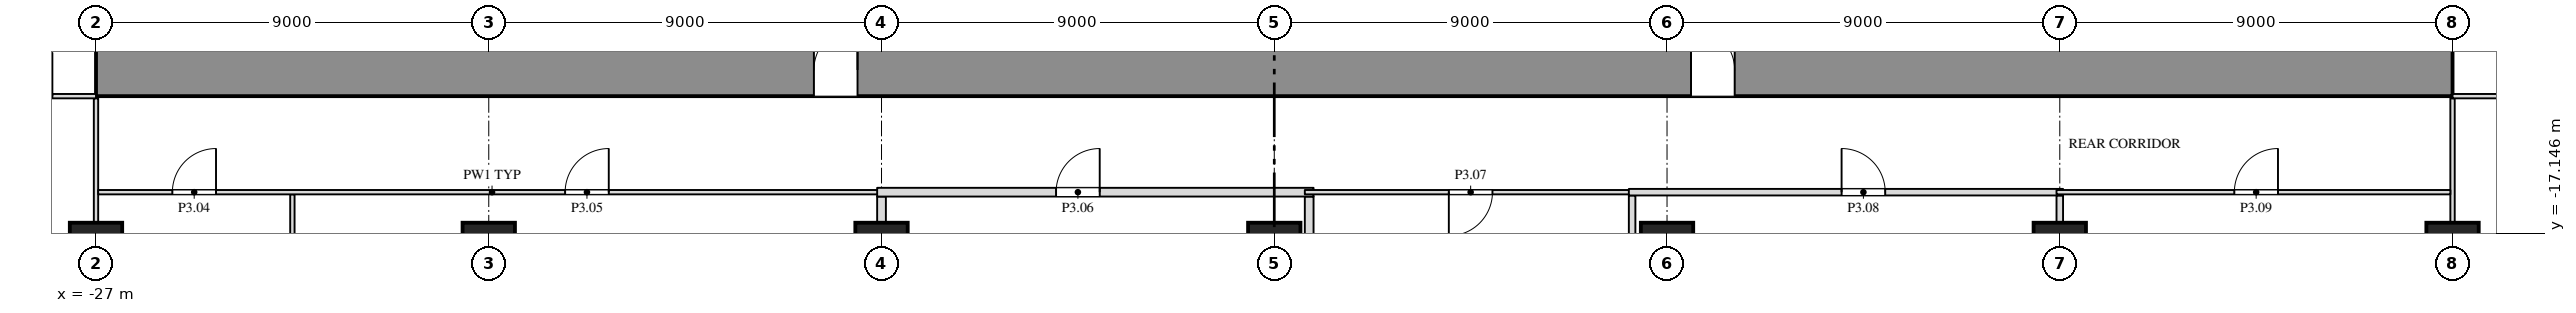
"""IFC4 building model, lengths in metres.
Left out: names, types, materials, properties, quantities, classifications, styles, units other than length and angle.
Written with IfcOpenShell. Run it as: python <this file> out.ifc"""

import sys

from ifc_helpers import new_model, si_unit, direction, frame, frame_2d, origin, origin_2d, place, context, subcontext, project, spatial, rectangle, extrude, element, fill, save


model = new_model("IFC4")
c1 = context("Model", 3, precision=1e-05, world=origin(), true_north=direction((0.0, 1.0)))
c2 = subcontext(c1, "Body", "Model", "MODEL_VIEW")
j1 = project(units=[si_unit("LENGTHUNIT", "METRE"), si_unit("PLANEANGLEUNIT", "RADIAN")], contexts=[c1])
p1 = place(None, origin())
s1 = spatial("IfcSite", under=j1, at=p1, CompositionType="ELEMENT")
p2 = place(p1, origin())
s2 = spatial("IfcBuilding", under=s1, at=p2, CompositionType="ELEMENT")
p3 = place(p2, frame((0.0, 0.0, 21.0)))
s3 = spatial("IfcBuildingStorey", under=s2, at=p3, CompositionType="ELEMENT", Elevation=21.0)
for number, where, z_axis, x_axis in (
    (1, (-27.0, -17.5, 0.0), (0.0, 0.0, 1.0), (1.0, 0.0, 0.0)),
    (2, (-18.0, -17.5, 0.0), (0.0, 0.0, 1.0), (1.0, 0.0, 0.0)),
    (3, (-9.0, -17.5, 0.0), (0.0, 0.0, 1.0), (1.0, 0.0, 0.0)),
    (4, (0.0, -17.5, 0.0), (0.0, 0.0, 1.0), (1.0, 0.0, 0.0)),
    (5, (9.0, -17.5, 0.0), (0.0, 0.0, 1.0), (1.0, 0.0, 0.0)),
    (6, (18.0, -17.5, 0.0), (0.0, 0.0, 1.0), (1.0, 0.0, 0.0)),
    (7, (27.0, -17.5, 0.0), (0.0, 0.0, 1.0), (1.0, 0.0, 0.0)),
):
    element("IfcColumn", number, at=place(p3, frame(where, z_axis=z_axis, x_axis=x_axis)), inside=s3, PredefinedType="COLUMN", context=c2, shape_type="SweptSolid", body=[
        extrude(rectangle(XDim=1.2, YDim=1.2, at=origin_2d()), origin(), (0.0, 0.0, 1.0), 6.0),
    ])
p4 = place(p3, frame((-27.0, -13.4, 0.0), z_axis=(0.0, 0.0, 1.0), x_axis=(1.0, 0.0, 0.0)))
e8 = element("IfcWall", 8, at=p4, inside=s3, PredefinedType="SHEAR", context=c2, shape_type="SweptSolid", body=[
    extrude(rectangle(XDim=54.0, YDim=1.2, at=frame_2d((27.0, 0.0))), origin(), (0.0, 0.0, 1.0), 5.7),
])
p5 = place(p4, frame((16.45, 0.0, 0.0)))
e9 = element("IfcOpeningElement", 9, at=p5, cuts=e8, PredefinedType="OPENING", context=c2, shape_type="SweptSolid", body=[
    extrude(rectangle(XDim=1.0, YDim=2.1, at=frame_2d((0.5, 1.05))), frame((0.0, 0.612, 0.0), z_axis=(0.0, -1.0, 0.0), x_axis=(1.0, 0.0, 0.0)), (0.0, 0.0, 1.0), 1.224),
])
p6 = place(p4, frame((36.55, 0.0, 0.0)))
e10 = element("IfcOpeningElement", 10, at=p6, cuts=e8, PredefinedType="OPENING", context=c2, shape_type="SweptSolid", body=[
    extrude(rectangle(XDim=1.0, YDim=2.1, at=frame_2d((0.5, 1.05))), frame((0.0, 0.612, 0.0), z_axis=(0.0, -1.0, 0.0), x_axis=(1.0, 0.0, 0.0)), (0.0, 0.0, 1.0), 1.224),
])
p7 = place(p3, frame((-27.0, -16.9, 0.0), z_axis=(0.0, 0.0, 1.0), x_axis=(0.0, 1.0, 0.0)))
e11 = element("IfcWall", 11, at=p7, inside=s3, PredefinedType="PARTITIONING", context=c2, shape_type="SweptSolid", body=[
    extrude(rectangle(XDim=2.85, YDim=0.1, at=frame_2d((1.425, 0.0))), origin(), (0.0, 0.0, 1.0), 5.088),
])
p8 = place(p3, frame((-22.5, -26.663, 0.0), z_axis=(0.0, 0.0, 1.0), x_axis=(0.0, 1.0, 0.0)))
e12 = element("IfcWall", 12, at=p8, inside=s3, PredefinedType="PARTITIONING", context=c2, shape_type="SweptSolid", body=[
    extrude(rectangle(XDim=10.413, YDim=0.1, at=frame_2d((5.206, 0.0))), origin(), (0.0, 0.0, 1.0), 5.088),
])
p9 = place(p3, frame((-9.0, -16.9, 0.0), z_axis=(0.0, 0.0, 1.0), x_axis=(0.0, 1.0, 0.0)))
e13 = element("IfcWall", 13, at=p9, inside=s3, PredefinedType="PARTITIONING", context=c2, shape_type="SweptSolid", body=[
    extrude(rectangle(XDim=0.6, YDim=0.2, at=frame_2d((0.3, 0.0))), origin(), (0.0, 0.0, 1.0), 5.7),
])
p10 = place(p3, frame((0.8, -27.2, 0.0), z_axis=(0.0, 0.0, 1.0), x_axis=(0.0, 1.0, 0.0)))
e14 = element("IfcWall", 14, at=p10, inside=s3, PredefinedType="PARTITIONING", context=c2, shape_type="SweptSolid", body=[
    extrude(rectangle(XDim=10.9, YDim=0.2, at=frame_2d((5.45, 0.0))), origin(), (0.0, 0.0, 1.0), 5.7),
])
p11 = place(p3, frame((8.2, -27.2, 0.0), z_axis=(0.0, 0.0, 1.0), x_axis=(0.0, 1.0, 0.0)))
e15 = element("IfcWall", 15, at=p11, inside=s3, PredefinedType="PARTITIONING", context=c2, shape_type="SweptSolid", body=[
    extrude(rectangle(XDim=10.925, YDim=0.15, at=frame_2d((5.462, 0.0))), origin(), (0.0, 0.0, 1.0), 5.7),
])
p12 = place(p3, frame((18.0, -16.9, 0.0), z_axis=(0.0, 0.0, 1.0), x_axis=(0.0, 1.0, 0.0)))
e16 = element("IfcWall", 16, at=p12, inside=s3, PredefinedType="PARTITIONING", context=c2, shape_type="SweptSolid", body=[
    extrude(rectangle(XDim=0.625, YDim=0.15, at=frame_2d((0.312, 0.0))), origin(), (0.0, 0.0, 1.0), 5.7),
])
p13 = place(p3, frame((27.0, -16.9, 0.0), z_axis=(0.0, 0.0, 1.0), x_axis=(0.0, 1.0, 0.0)))
e17 = element("IfcWall", 17, at=p13, inside=s3, PredefinedType="PARTITIONING", context=c2, shape_type="SweptSolid", body=[
    extrude(rectangle(XDim=2.85, YDim=0.1, at=frame_2d((1.425, 0.0))), origin(), (0.0, 0.0, 1.0), 5.088),
])
p14 = place(p3, frame((-26.95, -16.2, 0.0), z_axis=(0.0, 0.0, 1.0), x_axis=(1.0, 0.0, 0.0)))
e18 = element("IfcWall", 18, at=p14, inside=s3, PredefinedType="PARTITIONING", context=c2, shape_type="SweptSolid", body=[
    extrude(rectangle(XDim=18.05, YDim=0.1, at=frame_2d((9.025, 0.0))), origin(), (0.0, 0.0, 1.0), 5.7),
])
p15 = place(p14, frame((1.7, 0.0, 0.0)))
e19 = element("IfcOpeningElement", 19, at=p15, cuts=e18, PredefinedType="OPENING", context=c2, shape_type="SweptSolid", body=[
    extrude(rectangle(XDim=1.0, YDim=2.1, at=frame_2d((0.5, 1.05))), frame((0.0, 0.062, 0.0), z_axis=(0.0, -1.0, 0.0), x_axis=(1.0, 0.0, 0.0)), (0.0, 0.0, 1.0), 0.124),
])
p16 = place(p14, frame((10.7, 0.0, 0.0)))
e20 = element("IfcOpeningElement", 20, at=p16, cuts=e18, PredefinedType="OPENING", context=c2, shape_type="SweptSolid", body=[
    extrude(rectangle(XDim=1.0, YDim=2.1, at=frame_2d((0.5, 1.05))), frame((0.0, 0.062, 0.0), z_axis=(0.0, -1.0, 0.0), x_axis=(1.0, 0.0, 0.0)), (0.0, 0.0, 1.0), 0.124),
])
p17 = place(p3, frame((-9.1, -16.2, 0.0), z_axis=(0.0, 0.0, 1.0), x_axis=(1.0, 0.0, 0.0)))
e21 = element("IfcWall", 21, at=p17, inside=s3, PredefinedType="PARTITIONING", context=c2, shape_type="SweptSolid", body=[
    extrude(rectangle(XDim=10.0, YDim=0.2, at=frame_2d((5.0, 0.0))), origin(), (0.0, 0.0, 1.0), 5.7),
])
p18 = place(p17, frame((4.1, 0.0, 0.0)))
e22 = element("IfcOpeningElement", 22, at=p18, cuts=e21, PredefinedType="OPENING", context=c2, shape_type="SweptSolid", body=[
    extrude(rectangle(XDim=1.0, YDim=2.1, at=frame_2d((0.5, 1.05))), frame((0.0, 0.112, 0.0), z_axis=(0.0, -1.0, 0.0), x_axis=(1.0, 0.0, 0.0)), (0.0, 0.0, 1.0), 0.224),
])
p19 = place(p3, frame((0.7, -16.2, 0.0), z_axis=(0.0, 0.0, 1.0), x_axis=(1.0, 0.0, 0.0)))
e23 = element("IfcWall", 23, at=p19, inside=s3, PredefinedType="PARTITIONING", context=c2, shape_type="SweptSolid", body=[
    extrude(rectangle(XDim=7.575, YDim=0.1, at=frame_2d((3.788, 0.0))), origin(), (0.0, 0.0, 1.0), 5.7),
])
p20 = place(p19, frame((3.3, 0.0, 0.0)))
e24 = element("IfcOpeningElement", 24, at=p20, cuts=e23, PredefinedType="OPENING", context=c2, shape_type="SweptSolid", body=[
    extrude(rectangle(XDim=1.0, YDim=2.1, at=frame_2d((0.5, 1.05))), frame((0.0, 0.062, 0.0), z_axis=(0.0, -1.0, 0.0), x_axis=(1.0, 0.0, 0.0)), (0.0, 0.0, 1.0), 0.124),
])
p21 = place(p3, frame((8.125, -16.2, 0.0), z_axis=(0.0, 0.0, 1.0), x_axis=(1.0, 0.0, 0.0)))
e25 = element("IfcWall", 25, at=p21, inside=s3, PredefinedType="PARTITIONING", context=c2, shape_type="SweptSolid", body=[
    extrude(rectangle(XDim=9.95, YDim=0.15, at=frame_2d((4.975, 0.0))), origin(), (0.0, 0.0, 1.0), 5.7),
])
p22 = place(p21, frame((4.875, 0.0, 0.0)))
e26 = element("IfcOpeningElement", 26, at=p22, cuts=e25, PredefinedType="OPENING", context=c2, shape_type="SweptSolid", body=[
    extrude(rectangle(XDim=1.0, YDim=2.1, at=frame_2d((0.5, 1.05))), frame((0.0, 0.087, 0.0), z_axis=(0.0, -1.0, 0.0), x_axis=(1.0, 0.0, 0.0)), (0.0, 0.0, 1.0), 0.174),
])
p23 = place(p3, frame((17.925, -16.2, 0.0), z_axis=(0.0, 0.0, 1.0), x_axis=(1.0, 0.0, 0.0)))
e27 = element("IfcWall", 27, at=p23, inside=s3, PredefinedType="PARTITIONING", context=c2, shape_type="SweptSolid", body=[
    extrude(rectangle(XDim=9.025, YDim=0.1, at=frame_2d((4.512, 0.0))), origin(), (0.0, 0.0, 1.0), 5.7),
])
p24 = place(p23, frame((4.075, 0.0, 0.0)))
e28 = element("IfcOpeningElement", 28, at=p24, cuts=e27, PredefinedType="OPENING", context=c2, shape_type="SweptSolid", body=[
    extrude(rectangle(XDim=1.0, YDim=2.1, at=frame_2d((0.5, 1.05))), frame((0.0, 0.062, 0.0), z_axis=(0.0, -1.0, 0.0), x_axis=(1.0, 0.0, 0.0)), (0.0, 0.0, 1.0), 0.124),
])
p25 = place(p3, frame((-38.2, -14.0, 0.0), z_axis=(0.0, 0.0, 1.0), x_axis=(1.0, 0.0, 0.0)))
e29 = element("IfcWall", 29, at=p25, inside=s3, PredefinedType="PARTITIONING", context=c2, shape_type="SweptSolid", body=[
    extrude(rectangle(XDim=11.2, YDim=0.1, at=frame_2d((5.6, 0.0))), origin(), (0.0, 0.0, 1.0), 5.7),
])
p26 = place(p25, frame((3.2, 0.0, 0.0)))
e30 = element("IfcOpeningElement", 30, at=p26, cuts=e29, PredefinedType="OPENING", context=c2, shape_type="SweptSolid", body=[
    extrude(rectangle(XDim=1.0, YDim=2.1, at=frame_2d((0.5, 1.05))), frame((0.0, 0.062, 0.0), z_axis=(0.0, -1.0, 0.0), x_axis=(1.0, 0.0, 0.0)), (0.0, 0.0, 1.0), 0.124),
])
p27 = place(p25, frame((9.2, 0.0, 0.0)))
e31 = element("IfcOpeningElement", 31, at=p27, cuts=e29, PredefinedType="OPENING", context=c2, shape_type="SweptSolid", body=[
    extrude(rectangle(XDim=1.0, YDim=2.1, at=frame_2d((0.5, 1.05))), frame((0.0, 0.062, 0.0), z_axis=(0.0, -1.0, 0.0), x_axis=(1.0, 0.0, 0.0)), (0.0, 0.0, 1.0), 0.124),
])
p28 = place(p3, frame((27.0, -14.0, 0.0), z_axis=(0.0, 0.0, 1.0), x_axis=(1.0, 0.0, 0.0)))
e32 = element("IfcWall", 32, at=p28, inside=s3, PredefinedType="PARTITIONING", context=c2, shape_type="SweptSolid", body=[
    extrude(rectangle(XDim=11.2, YDim=0.1, at=frame_2d((5.6, 0.0))), origin(), (0.0, 0.0, 1.0), 5.7),
])
p29 = place(p28, frame((3.0, 0.0, 0.0)))
e33 = element("IfcOpeningElement", 33, at=p29, cuts=e32, PredefinedType="OPENING", context=c2, shape_type="SweptSolid", body=[
    extrude(rectangle(XDim=1.0, YDim=2.1, at=frame_2d((0.5, 1.05))), frame((0.0, 0.062, 0.0), z_axis=(0.0, -1.0, 0.0), x_axis=(1.0, 0.0, 0.0)), (0.0, 0.0, 1.0), 0.124),
])
p30 = place(p28, frame((9.0, 0.0, 0.0)))
e34 = element("IfcOpeningElement", 34, at=p30, cuts=e32, PredefinedType="OPENING", context=c2, shape_type="SweptSolid", body=[
    extrude(rectangle(XDim=1.0, YDim=2.1, at=frame_2d((0.5, 1.05))), frame((0.0, 0.062, 0.0), z_axis=(0.0, -1.0, 0.0), x_axis=(1.0, 0.0, 0.0)), (0.0, 0.0, 1.0), 0.124),
])
p31 = place(p15, origin())
e35 = element("IfcDoor", 35, at=p31, inside=s3, OperationType="SINGLE_SWING_RIGHT", PredefinedType="DOOR", context=c2, shape_type="SweptSolid", body=[
    extrude(rectangle(XDim=1.0, YDim=2.1, at=frame_2d((0.5, 1.05))), frame((0.0, 0.025, 0.0), z_axis=(0.0, -1.0, 0.0), x_axis=(1.0, 0.0, 0.0)), (0.0, 0.0, 1.0), 0.05),
])
fill(e19, e35)
p32 = place(p16, origin())
e36 = element("IfcDoor", 36, at=p32, inside=s3, OperationType="SINGLE_SWING_RIGHT", PredefinedType="DOOR", context=c2, shape_type="SweptSolid", body=[
    extrude(rectangle(XDim=1.0, YDim=2.1, at=frame_2d((0.5, 1.05))), frame((0.0, 0.025, 0.0), z_axis=(0.0, -1.0, 0.0), x_axis=(1.0, 0.0, 0.0)), (0.0, 0.0, 1.0), 0.05),
])
fill(e20, e36)
p33 = place(p18, origin())
e37 = element("IfcDoor", 37, at=p33, inside=s3, OperationType="SINGLE_SWING_RIGHT", PredefinedType="DOOR", context=c2, shape_type="SweptSolid", body=[
    extrude(rectangle(XDim=1.0, YDim=2.1, at=frame_2d((0.5, 1.05))), frame((0.0, 0.025, 0.0), z_axis=(0.0, -1.0, 0.0), x_axis=(1.0, 0.0, 0.0)), (0.0, 0.0, 1.0), 0.05),
])
fill(e22, e37)
p34 = place(p20, origin())
e38 = element("IfcDoor", 38, at=p34, inside=s3, OperationType="SINGLE_SWING_RIGHT", PredefinedType="DOOR", context=c2, shape_type="SweptSolid", body=[
    extrude(rectangle(XDim=1.0, YDim=2.1, at=frame_2d((0.5, 1.05))), frame((0.0, 0.025, 0.0), z_axis=(0.0, -1.0, 0.0), x_axis=(1.0, 0.0, 0.0)), (0.0, 0.0, 1.0), 0.05),
])
fill(e24, e38)
p35 = place(p22, origin())
e39 = element("IfcDoor", 39, at=p35, inside=s3, OperationType="SINGLE_SWING_LEFT", PredefinedType="DOOR", context=c2, shape_type="SweptSolid", body=[
    extrude(rectangle(XDim=1.0, YDim=2.1, at=frame_2d((0.5, 1.05))), frame((0.0, 0.025, 0.0), z_axis=(0.0, -1.0, 0.0), x_axis=(1.0, 0.0, 0.0)), (0.0, 0.0, 1.0), 0.05),
])
fill(e26, e39)
p36 = place(p24, origin())
e40 = element("IfcDoor", 40, at=p36, inside=s3, OperationType="SINGLE_SWING_RIGHT", PredefinedType="DOOR", context=c2, shape_type="SweptSolid", body=[
    extrude(rectangle(XDim=1.0, YDim=2.1, at=frame_2d((0.5, 1.05))), frame((0.0, 0.025, 0.0), z_axis=(0.0, -1.0, 0.0), x_axis=(1.0, 0.0, 0.0)), (0.0, 0.0, 1.0), 0.05),
])
fill(e28, e40)
p37 = place(p5, origin())
e41 = element("IfcDoor", 41, at=p37, inside=s3, OperationType="SINGLE_SWING_RIGHT", PredefinedType="DOOR", context=c2, shape_type="SweptSolid", body=[
    extrude(rectangle(XDim=1.0, YDim=2.1, at=frame_2d((0.5, 1.05))), frame((0.0, 0.025, 0.0), z_axis=(0.0, -1.0, 0.0), x_axis=(1.0, 0.0, 0.0)), (0.0, 0.0, 1.0), 0.05),
])
fill(e9, e41)
p38 = place(p6, origin())
e42 = element("IfcDoor", 42, at=p38, inside=s3, OperationType="SINGLE_SWING_LEFT", PredefinedType="DOOR", context=c2, shape_type="SweptSolid", body=[
    extrude(rectangle(XDim=1.0, YDim=2.1, at=frame_2d((0.5, 1.05))), frame((0.0, 0.025, 0.0), z_axis=(0.0, -1.0, 0.0), x_axis=(1.0, 0.0, 0.0)), (0.0, 0.0, 1.0), 0.05),
])
fill(e10, e42)
save(model, sys.argv[1])
